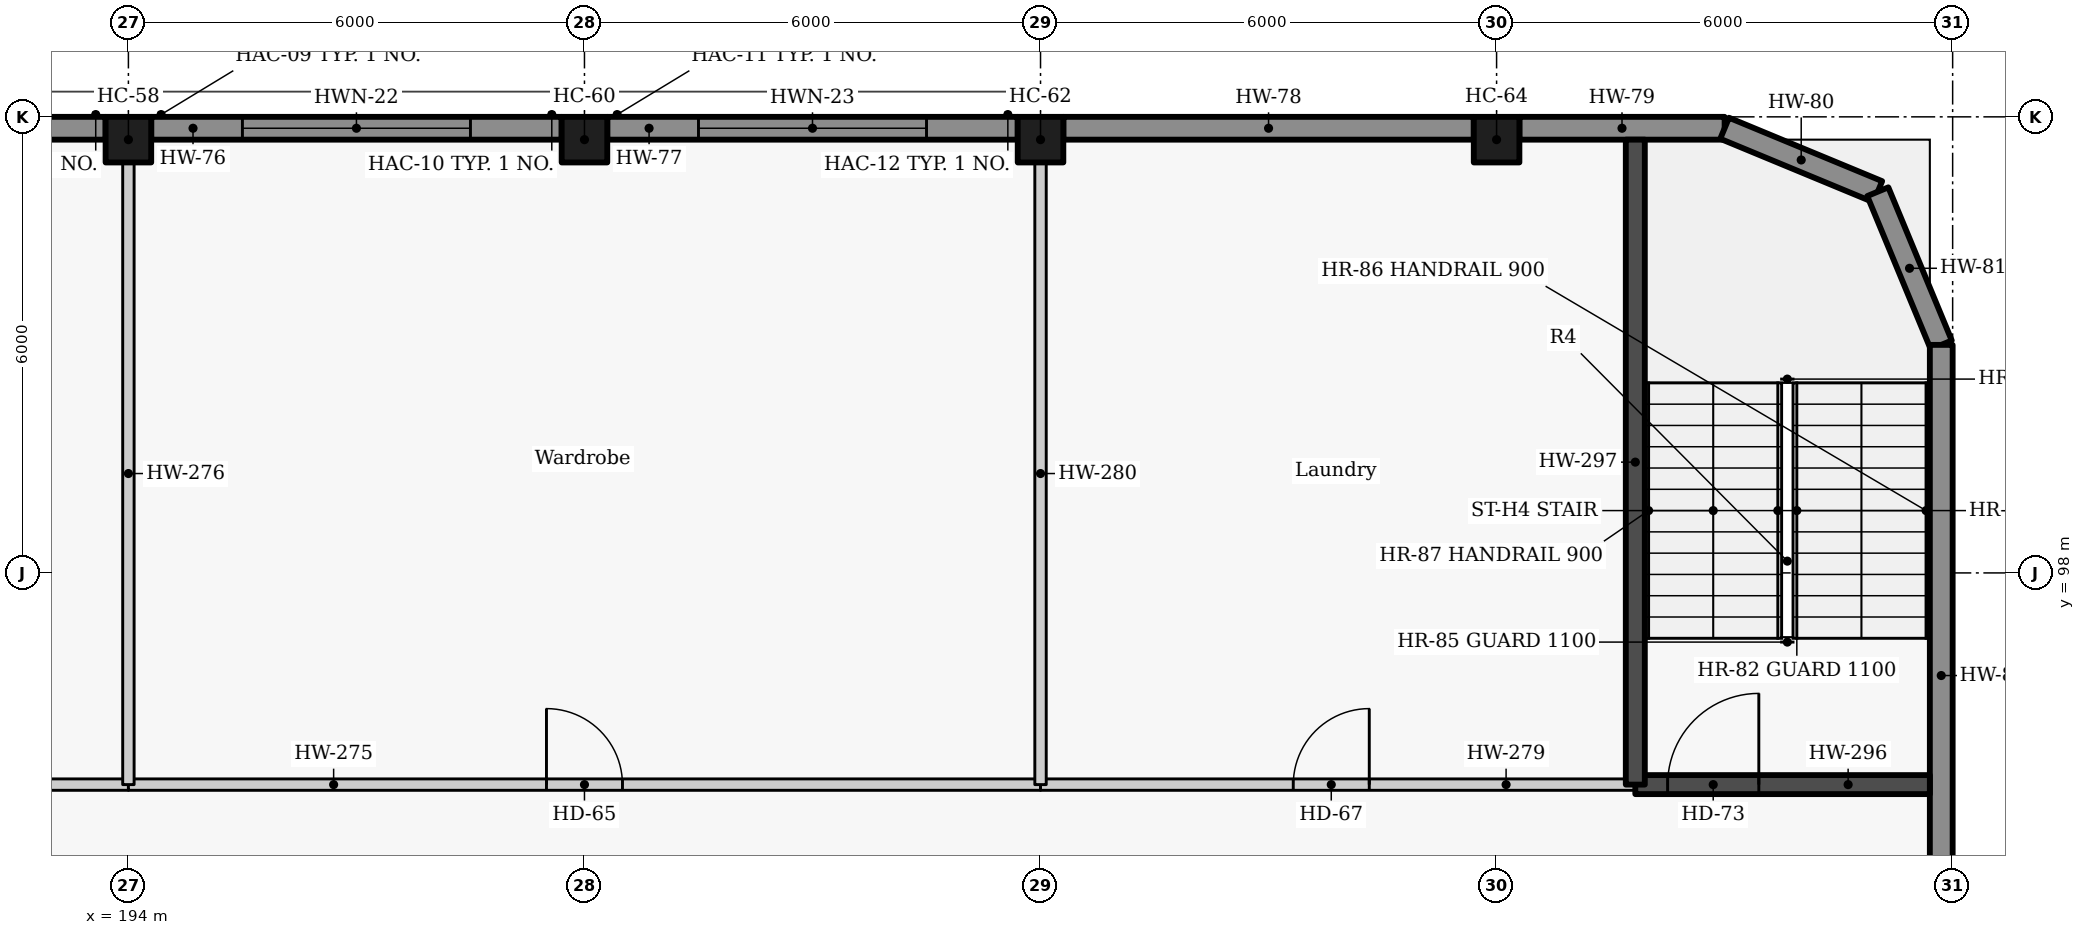
"""IFC4 building model, lengths in metres.
Left out: names, types, materials, properties, quantities, classifications, styles, units other than length and angle.
Written with IfcOpenShell. Run it as: python <this file> out.ifc"""

import sys

from ifc_helpers import new_model, si_unit, direction, frame, frame_2d, origin, origin_2d, place, context, subcontext, project, spatial, rectangle, extrude, element, fill, save


model = new_model("IFC4")
c1 = context("Model", 3, precision=1e-05, world=origin(), true_north=direction((0.0, 1.0)))
c2 = subcontext(c1, "Body", "Model", "MODEL_VIEW")
j1 = project(units=[si_unit("LENGTHUNIT", "METRE"), si_unit("PLANEANGLEUNIT", "RADIAN")], contexts=[c1])
p1 = place(None, origin())
s1 = spatial("IfcSite", under=j1, at=p1, CompositionType="ELEMENT")
p2 = place(p1, origin())
s2 = spatial("IfcBuilding", under=s1, at=p2, CompositionType="ELEMENT")
p3 = place(p2, frame((0.0, 0.0, 6.6)))
s3 = spatial("IfcBuildingStorey", under=s2, at=p3, CompositionType="ELEMENT", Elevation=6.6)
for number, where, z_axis, x_axis in (
    (1, (194.0, 103.7, 0.0), (0.0, 0.0, 1.0), (1.0, 0.0, 0.0)),
    (2, (200.0, 103.7, 0.0), (0.0, 0.0, 1.0), (1.0, 0.0, 0.0)),
    (3, (206.0, 103.7, 0.0), (0.0, 0.0, 1.0), (1.0, 0.0, 0.0)),
    (4, (212.0, 103.7, 0.0), (0.0, 0.0, 1.0), (1.0, 0.0, 0.0)),
):
    element("IfcColumn", number, at=place(p3, frame(where, z_axis=z_axis, x_axis=x_axis)), inside=s3, PredefinedType="COLUMN", context=c2, shape_type="SweptSolid", body=[
        extrude(rectangle(XDim=0.6, YDim=0.6, at=origin_2d()), origin(), (0.0, 0.0, 1.0), 4.8),
    ])
p4 = place(p3, frame((188.3, 103.85, 0.0), z_axis=(0.0, 0.0, 1.0), x_axis=(1.0, 0.0, 0.0)))
e5 = element("IfcWall", 5, at=p4, inside=s3, PredefinedType="SOLIDWALL", context=c2, shape_type="SweptSolid", body=[
    extrude(rectangle(XDim=5.4, YDim=0.3, at=frame_2d((2.7, 0.0))), origin(), (0.0, 0.0, 1.0), 4.8),
])
p5 = place(p4, frame((1.2, 0.0, 0.9)))
e6 = element("IfcOpeningElement", 6, at=p5, cuts=e5, PredefinedType="OPENING", context=c2, shape_type="SweptSolid", body=[
    extrude(rectangle(XDim=3.0, YDim=1.8, at=frame_2d((1.5, 0.9))), frame((0.0, 0.16, 0.0), z_axis=(0.0, -1.0, 0.0), x_axis=(1.0, 0.0, 0.0)), (0.0, 0.0, 1.0), 0.32),
])
p6 = place(p3, frame((194.3, 103.85, 0.0), z_axis=(0.0, 0.0, 1.0), x_axis=(1.0, 0.0, 0.0)))
e7 = element("IfcWall", 7, at=p6, inside=s3, PredefinedType="SOLIDWALL", context=c2, shape_type="SweptSolid", body=[
    extrude(rectangle(XDim=5.4, YDim=0.3, at=frame_2d((2.7, 0.0))), origin(), (0.0, 0.0, 1.0), 4.8),
])
p7 = place(p6, frame((1.2, 0.0, 0.9)))
e8 = element("IfcOpeningElement", 8, at=p7, cuts=e7, PredefinedType="OPENING", context=c2, shape_type="SweptSolid", body=[
    extrude(rectangle(XDim=3.0, YDim=1.8, at=frame_2d((1.5, 0.9))), frame((0.0, 0.16, 0.0), z_axis=(0.0, -1.0, 0.0), x_axis=(1.0, 0.0, 0.0)), (0.0, 0.0, 1.0), 0.32),
])
p8 = place(p3, frame((200.3, 103.85, 0.0), z_axis=(0.0, 0.0, 1.0), x_axis=(1.0, 0.0, 0.0)))
e9 = element("IfcWall", 9, at=p8, inside=s3, PredefinedType="SOLIDWALL", context=c2, shape_type="SweptSolid", body=[
    extrude(rectangle(XDim=5.4, YDim=0.3, at=frame_2d((2.7, 0.0))), origin(), (0.0, 0.0, 1.0), 4.8),
])
p9 = place(p8, frame((1.2, 0.0, 0.9)))
e10 = element("IfcOpeningElement", 10, at=p9, cuts=e9, PredefinedType="OPENING", context=c2, shape_type="SweptSolid", body=[
    extrude(rectangle(XDim=3.0, YDim=1.8, at=frame_2d((1.5, 0.9))), frame((0.0, 0.16, 0.0), z_axis=(0.0, -1.0, 0.0), x_axis=(1.0, 0.0, 0.0)), (0.0, 0.0, 1.0), 0.32),
])
p10 = place(p3, frame((206.3, 103.85, 0.0), z_axis=(0.0, 0.0, 1.0), x_axis=(1.0, 0.0, 0.0)))
e11 = element("IfcWall", 11, at=p10, inside=s3, PredefinedType="SOLIDWALL", context=c2, shape_type="SweptSolid", body=[
    extrude(rectangle(XDim=5.4, YDim=0.3, at=frame_2d((2.7, 0.0))), origin(), (0.0, 0.0, 1.0), 4.8),
])
p11 = place(p3, frame((212.3, 103.85, 0.0), z_axis=(0.0, 0.0, 1.0), x_axis=(1.0, 0.0, 0.0)))
e12 = element("IfcWall", 12, at=p11, inside=s3, PredefinedType="SOLIDWALL", context=c2, shape_type="SweptSolid", body=[
    extrude(rectangle(XDim=2.7, YDim=0.3, at=frame_2d((1.35, 0.0))), origin(), (0.0, 0.0, 1.0), 4.8),
])
for number, where, z_axis, x_axis in (
    (13, (215.0, 103.85, 0.0), (0.0, 0.0, 1.0), (0.924, -0.383, 0.0)),
    (14, (217.015, 103.015, 0.0), (0.0, 0.0, 1.0), (0.383, -0.924, 0.0)),
):
    element("IfcWall", number, at=place(p3, frame(where, z_axis=z_axis, x_axis=x_axis)), inside=s3, PredefinedType="SOLIDWALL", context=c2, shape_type="SweptSolid", body=[
        extrude(rectangle(XDim=2.181, YDim=0.3, at=frame_2d((1.091, 0.0))), origin(), (0.0, 0.0, 1.0), 4.8),
    ])
p12 = place(p3, frame((217.85, 101.0, 0.0), z_axis=(0.0, 0.0, 1.0), x_axis=(0.0, -1.0, 0.0)))
e15 = element("IfcWall", 15, at=p12, inside=s3, PredefinedType="SOLIDWALL", context=c2, shape_type="SweptSolid", body=[
    extrude(rectangle(XDim=8.7, YDim=0.3, at=frame_2d((4.35, 0.0))), origin(), (0.0, 0.0, 1.0), 4.8),
])
p13 = place(p3, frame((188.0, 95.215, 0.0), z_axis=(0.0, 0.0, 1.0), x_axis=(1.0, 0.0, 0.0)))
e16 = element("IfcWall", 16, at=p13, inside=s3, PredefinedType="PARTITIONING", context=c2, shape_type="SweptSolid", body=[
    extrude(rectangle(XDim=6.0, YDim=0.15, at=frame_2d((3.0, 0.0))), origin(), (0.0, 0.0, 1.0), 4.45),
])
p14 = place(p13, frame((2.5, 0.0, 0.0)))
e17 = element("IfcOpeningElement", 17, at=p14, cuts=e16, PredefinedType="OPENING", context=c2, shape_type="SweptSolid", body=[
    extrude(rectangle(XDim=1.0, YDim=2.1, at=frame_2d((0.5, 1.05))), frame((0.0, 0.085, 0.0), z_axis=(0.0, -1.0, 0.0), x_axis=(1.0, 0.0, 0.0)), (0.0, 0.0, 1.0), 0.17),
])
p15 = place(p3, frame((194.0, 95.215, 0.0), z_axis=(0.0, 0.0, 1.0), x_axis=(1.0, 0.0, 0.0)))
e18 = element("IfcWall", 18, at=p15, inside=s3, PredefinedType="PARTITIONING", context=c2, shape_type="SweptSolid", body=[
    extrude(rectangle(XDim=12.0, YDim=0.15, at=frame_2d((6.0, 0.0))), origin(), (0.0, 0.0, 1.0), 4.45),
])
p16 = place(p15, frame((5.5, 0.0, 0.0)))
e19 = element("IfcOpeningElement", 19, at=p16, cuts=e18, PredefinedType="OPENING", context=c2, shape_type="SweptSolid", body=[
    extrude(rectangle(XDim=1.0, YDim=2.1, at=frame_2d((0.5, 1.05))), frame((0.0, 0.085, 0.0), z_axis=(0.0, -1.0, 0.0), x_axis=(1.0, 0.0, 0.0)), (0.0, 0.0, 1.0), 0.17),
])
p17 = place(p3, frame((194.0, 103.4, 0.0), z_axis=(0.0, 0.0, 1.0), x_axis=(0.0, -1.0, 0.0)))
e20 = element("IfcWall", 20, at=p17, inside=s3, PredefinedType="PARTITIONING", context=c2, shape_type="SweptSolid", body=[
    extrude(rectangle(XDim=8.185, YDim=0.15, at=frame_2d((4.092, 0.0))), origin(), (0.0, 0.0, 1.0), 4.45),
])
p18 = place(p3, frame((206.0, 95.215, 0.0), z_axis=(0.0, 0.0, 1.0), x_axis=(1.0, 0.0, 0.0)))
e21 = element("IfcWall", 21, at=p18, inside=s3, PredefinedType="PARTITIONING", context=c2, shape_type="SweptSolid", body=[
    extrude(rectangle(XDim=7.825, YDim=0.15, at=frame_2d((3.913, 0.0))), origin(), (0.0, 0.0, 1.0), 4.45),
])
p19 = place(p18, frame((3.325, 0.0, 0.0)))
e22 = element("IfcOpeningElement", 22, at=p19, cuts=e21, PredefinedType="OPENING", context=c2, shape_type="SweptSolid", body=[
    extrude(rectangle(XDim=1.0, YDim=2.1, at=frame_2d((0.5, 1.05))), frame((0.0, 0.085, 0.0), z_axis=(0.0, -1.0, 0.0), x_axis=(1.0, 0.0, 0.0)), (0.0, 0.0, 1.0), 0.17),
])
p20 = place(p3, frame((206.0, 103.4, 0.0), z_axis=(0.0, 0.0, 1.0), x_axis=(0.0, -1.0, 0.0)))
e23 = element("IfcWall", 23, at=p20, inside=s3, PredefinedType="PARTITIONING", context=c2, shape_type="SweptSolid", body=[
    extrude(rectangle(XDim=8.185, YDim=0.15, at=frame_2d((4.092, 0.0))), origin(), (0.0, 0.0, 1.0), 4.45),
])
p21 = place(p3, frame((213.825, 95.215, 0.0), z_axis=(0.0, 0.0, 1.0), x_axis=(1.0, 0.0, 0.0)))
e24 = element("IfcWall", 24, at=p21, inside=s3, PredefinedType="SOLIDWALL", context=c2, shape_type="SweptSolid", body=[
    extrude(rectangle(XDim=3.875, YDim=0.25, at=frame_2d((1.938, 0.0))), origin(), (0.0, 0.0, 1.0), 4.8),
])
p22 = place(p21, frame((0.425, 0.0, 0.0)))
e25 = element("IfcOpeningElement", 25, at=p22, cuts=e24, PredefinedType="OPENING", context=c2, shape_type="SweptSolid", body=[
    extrude(rectangle(XDim=1.2, YDim=2.1, at=frame_2d((0.6, 1.05))), frame((0.0, 0.135, 0.0), z_axis=(0.0, -1.0, 0.0), x_axis=(1.0, 0.0, 0.0)), (0.0, 0.0, 1.0), 0.27),
])
p23 = place(p3, frame((213.825, 95.215, 0.0), z_axis=(0.0, 0.0, 1.0), x_axis=(0.0, 1.0, 0.0)))
e26 = element("IfcWall", 26, at=p23, inside=s3, PredefinedType="SOLIDWALL", context=c2, shape_type="SweptSolid", body=[
    extrude(rectangle(XDim=8.485, YDim=0.25, at=frame_2d((4.242, 0.0))), origin(), (0.0, 0.0, 1.0), 4.8),
])
p24 = place(p7, origin())
e27 = element("IfcWindow", 27, at=p24, inside=s3, PartitioningType="SINGLE_PANEL", PredefinedType="WINDOW", context=c2, shape_type="SweptSolid", body=[
    extrude(rectangle(XDim=3.0, YDim=1.8, at=frame_2d((1.5, 0.9))), frame((0.0, 0.03, 0.0), z_axis=(0.0, -1.0, 0.0), x_axis=(1.0, 0.0, 0.0)), (0.0, 0.0, 1.0), 0.06),
])
fill(e8, e27)
p25 = place(p9, origin())
e28 = element("IfcWindow", 28, at=p25, inside=s3, PartitioningType="SINGLE_PANEL", PredefinedType="WINDOW", context=c2, shape_type="SweptSolid", body=[
    extrude(rectangle(XDim=3.0, YDim=1.8, at=frame_2d((1.5, 0.9))), frame((0.0, 0.03, 0.0), z_axis=(0.0, -1.0, 0.0), x_axis=(1.0, 0.0, 0.0)), (0.0, 0.0, 1.0), 0.06),
])
fill(e10, e28)
p26 = place(p16, origin())
e29 = element("IfcDoor", 29, at=p26, inside=s3, OperationType="SINGLE_SWING_LEFT", PredefinedType="DOOR", context=c2, shape_type="SweptSolid", body=[
    extrude(rectangle(XDim=1.0, YDim=2.1, at=frame_2d((0.5, 1.05))), frame((0.0, 0.025, 0.0), z_axis=(0.0, -1.0, 0.0), x_axis=(1.0, 0.0, 0.0)), (0.0, 0.0, 1.0), 0.05),
])
fill(e19, e29)
p27 = place(p19, origin())
e30 = element("IfcDoor", 30, at=p27, inside=s3, OperationType="SINGLE_SWING_RIGHT", PredefinedType="DOOR", context=c2, shape_type="SweptSolid", body=[
    extrude(rectangle(XDim=1.0, YDim=2.1, at=frame_2d((0.5, 1.05))), frame((0.0, 0.025, 0.0), z_axis=(0.0, -1.0, 0.0), x_axis=(1.0, 0.0, 0.0)), (0.0, 0.0, 1.0), 0.05),
])
fill(e22, e30)
p28 = place(p22, origin())
e31 = element("IfcDoor", 31, at=p28, inside=s3, OperationType="SINGLE_SWING_RIGHT", PredefinedType="DOOR", context=c2, shape_type="SweptSolid", body=[
    extrude(rectangle(XDim=1.2, YDim=2.1, at=frame_2d((0.6, 1.05))), frame((0.0, 0.025, 0.0), z_axis=(0.0, -1.0, 0.0), x_axis=(1.0, 0.0, 0.0)), (0.0, 0.0, 1.0), 0.05),
])
fill(e25, e31)
save(model, sys.argv[1])
